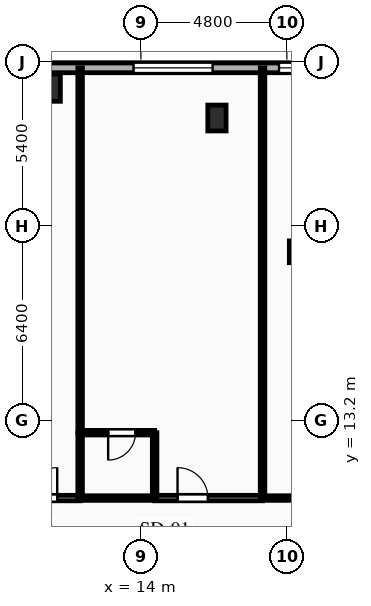
"""IFC4 building model, lengths in metres.
Left out: names, types, materials, properties, quantities, classifications, styles, units other than length and angle.
Written with IfcOpenShell. Run it as: python <this file> out.ifc"""

import sys

from ifc_helpers import new_model, si_unit, direction, frame, frame_2d, origin, origin_2d, place, context, subcontext, project, spatial, rectangle, i_section, extrude, element, fill, save


model = new_model("IFC4")
c1 = context("Model", 3, precision=1e-05, world=origin(), true_north=direction((0.0, 1.0)))
c2 = subcontext(c1, "Body", "Model", "MODEL_VIEW")
j1 = project(units=[si_unit("LENGTHUNIT", "METRE"), si_unit("PLANEANGLEUNIT", "RADIAN")], contexts=[c1])
p1 = place(None, origin())
s1 = spatial("IfcSite", under=j1, at=p1, CompositionType="ELEMENT")
p2 = place(p1, origin())
s2 = spatial("IfcBuilding", under=s1, at=p2, CompositionType="ELEMENT")
p3 = place(p2, frame((0.0, 0.0, 22.5)))
s3 = spatial("IfcBuildingStorey", under=s2, at=p3, CompositionType="ELEMENT", Elevation=22.5)
p4 = place(p3, frame((11.0, 24.15, 0.0), z_axis=(0.0, 0.0, 1.0), x_axis=(1.0, 0.0, 0.0)))
e1 = element("IfcColumn", 1, at=p4, inside=s3, PredefinedType="COLUMN", context=c2, shape_type="SweptSolid", body=[
    extrude(rectangle(XDim=0.7, YDim=0.9, at=origin_2d()), origin(), (0.0, 0.0, 1.0), 4.5),
])
p5 = place(p3, frame((16.5, 23.15, 0.0), z_axis=(0.0, 0.0, 1.0), x_axis=(1.0, 0.0, 0.0)))
e2 = element("IfcColumn", 2, at=p5, inside=s3, PredefinedType="PILASTER", context=c2, shape_type="SweptSolid", body=[
    extrude(rectangle(XDim=0.6, YDim=0.85, at=origin_2d()), origin(), (0.0, 0.0, 1.0), 4.5),
])
p6 = place(p3, frame((19.033, 18.75, 0.0), z_axis=(0.0, 0.0, 1.0), x_axis=(1.0, 0.0, 0.0)))
e3 = element("IfcColumn", 3, at=p6, inside=s3, PredefinedType="COLUMN", context=c2, shape_type="SweptSolid", body=[
    extrude(i_section(OverallWidth=0.304, OverallDepth=0.716, WebThickness=0.021, FlangeThickness=0.04, FilletRadius=0.027, at=origin_2d()), origin(), (0.0, 0.0, 1.0), 4.5),
])
p7 = place(p3, frame((-36.8, 24.8, 0.0), z_axis=(0.0, 0.0, 1.0), x_axis=(1.0, 0.0, 0.0)))
e4 = element("IfcWall", 4, at=p7, inside=s3, PredefinedType="SOLIDWALL", context=c2, shape_type="SweptSolid", body=[
    extrude(rectangle(XDim=73.6, YDim=0.32, at=frame_2d((36.8, 0.0))), origin(), (0.0, 0.0, 1.0), 4.16),
])
p8 = place(p7, frame((1.079, 0.0, 0.85)))
e5 = element("IfcOpeningElement", 5, at=p8, cuts=e4, PredefinedType="OPENING", context=c2, shape_type="SweptSolid", body=[
    extrude(rectangle(XDim=2.3, YDim=2.4, at=frame_2d((1.15, 1.2))), frame((0.0, 0.17, 0.0), z_axis=(0.0, -1.0, 0.0), x_axis=(1.0, 0.0, 0.0)), (0.0, 0.0, 1.0), 0.34),
])
p9 = place(p7, frame((8.431, 0.0, 0.85)))
e6 = element("IfcOpeningElement", 6, at=p9, cuts=e4, PredefinedType="OPENING", context=c2, shape_type="SweptSolid", body=[
    extrude(rectangle(XDim=2.6, YDim=2.4, at=frame_2d((1.3, 1.2))), frame((0.0, 0.17, 0.0), z_axis=(0.0, -1.0, 0.0), x_axis=(1.0, 0.0, 0.0)), (0.0, 0.0, 1.0), 0.34),
])
p10 = place(p7, frame((13.316, 0.0, 0.85)))
e7 = element("IfcOpeningElement", 7, at=p10, cuts=e4, PredefinedType="OPENING", context=c2, shape_type="SweptSolid", body=[
    extrude(rectangle(XDim=1.1, YDim=1.85, at=frame_2d((0.55, 0.925))), frame((0.0, 0.17, 0.0), z_axis=(0.0, -1.0, 0.0), x_axis=(1.0, 0.0, 0.0)), (0.0, 0.0, 1.0), 0.34),
])
p11 = place(p7, frame((16.339, 0.0, 0.85)))
e8 = element("IfcOpeningElement", 8, at=p11, cuts=e4, PredefinedType="OPENING", context=c2, shape_type="SweptSolid", body=[
    extrude(rectangle(XDim=2.0, YDim=2.4, at=frame_2d((1.0, 1.2))), frame((0.0, 0.17, 0.0), z_axis=(0.0, -1.0, 0.0), x_axis=(1.0, 0.0, 0.0)), (0.0, 0.0, 1.0), 0.34),
])
p12 = place(p7, frame((21.875, 0.0, 0.85)))
e9 = element("IfcOpeningElement", 9, at=p12, cuts=e4, PredefinedType="OPENING", context=c2, shape_type="SweptSolid", body=[
    extrude(rectangle(XDim=2.3, YDim=2.4, at=frame_2d((1.15, 1.2))), frame((0.0, 0.17, 0.0), z_axis=(0.0, -1.0, 0.0), x_axis=(1.0, 0.0, 0.0)), (0.0, 0.0, 1.0), 0.34),
])
p13 = place(p7, frame((26.53, 0.0, 0.85)))
e10 = element("IfcOpeningElement", 10, at=p13, cuts=e4, PredefinedType="OPENING", context=c2, shape_type="SweptSolid", body=[
    extrude(rectangle(XDim=2.6, YDim=2.4, at=frame_2d((1.3, 1.2))), frame((0.0, 0.17, 0.0), z_axis=(0.0, -1.0, 0.0), x_axis=(1.0, 0.0, 0.0)), (0.0, 0.0, 1.0), 0.34),
])
p14 = place(p7, frame((32.537, 0.0, 0.85)))
e11 = element("IfcOpeningElement", 11, at=p14, cuts=e4, PredefinedType="OPENING", context=c2, shape_type="SweptSolid", body=[
    extrude(rectangle(XDim=2.6, YDim=2.4, at=frame_2d((1.3, 1.2))), frame((0.0, 0.17, 0.0), z_axis=(0.0, -1.0, 0.0), x_axis=(1.0, 0.0, 0.0)), (0.0, 0.0, 1.0), 0.34),
])
p15 = place(p7, frame((38.543, 0.0, 0.85)))
e12 = element("IfcOpeningElement", 12, at=p15, cuts=e4, PredefinedType="OPENING", context=c2, shape_type="SweptSolid", body=[
    extrude(rectangle(XDim=2.6, YDim=2.4, at=frame_2d((1.3, 1.2))), frame((0.0, 0.17, 0.0), z_axis=(0.0, -1.0, 0.0), x_axis=(1.0, 0.0, 0.0)), (0.0, 0.0, 1.0), 0.34),
])
p16 = place(p7, frame((44.55, 0.0, 0.85)))
e13 = element("IfcOpeningElement", 13, at=p16, cuts=e4, PredefinedType="OPENING", context=c2, shape_type="SweptSolid", body=[
    extrude(rectangle(XDim=2.6, YDim=2.4, at=frame_2d((1.3, 1.2))), frame((0.0, 0.17, 0.0), z_axis=(0.0, -1.0, 0.0), x_axis=(1.0, 0.0, 0.0)), (0.0, 0.0, 1.0), 0.34),
])
p17 = place(p7, frame((50.556, 0.0, 0.85)))
e14 = element("IfcOpeningElement", 14, at=p17, cuts=e4, PredefinedType="OPENING", context=c2, shape_type="SweptSolid", body=[
    extrude(rectangle(XDim=2.6, YDim=2.4, at=frame_2d((1.3, 1.2))), frame((0.0, 0.17, 0.0), z_axis=(0.0, -1.0, 0.0), x_axis=(1.0, 0.0, 0.0)), (0.0, 0.0, 1.0), 0.34),
])
p18 = place(p7, frame((55.341, 0.0, 0.85)))
e15 = element("IfcOpeningElement", 15, at=p18, cuts=e4, PredefinedType="OPENING", context=c2, shape_type="SweptSolid", body=[
    extrude(rectangle(XDim=2.0, YDim=2.4, at=frame_2d((1.0, 1.2))), frame((0.0, 0.17, 0.0), z_axis=(0.0, -1.0, 0.0), x_axis=(1.0, 0.0, 0.0)), (0.0, 0.0, 1.0), 0.34),
])
p19 = place(p7, frame((59.16, 0.0, 0.85)))
e16 = element("IfcOpeningElement", 16, at=p19, cuts=e4, PredefinedType="OPENING", context=c2, shape_type="SweptSolid", body=[
    extrude(rectangle(XDim=1.1, YDim=1.85, at=frame_2d((0.55, 0.925))), frame((0.0, 0.17, 0.0), z_axis=(0.0, -1.0, 0.0), x_axis=(1.0, 0.0, 0.0)), (0.0, 0.0, 1.0), 0.34),
])
p20 = place(p7, frame((62.649, 0.0, 0.85)))
e17 = element("IfcOpeningElement", 17, at=p20, cuts=e4, PredefinedType="OPENING", context=c2, shape_type="SweptSolid", body=[
    extrude(rectangle(XDim=2.6, YDim=2.4, at=frame_2d((1.3, 1.2))), frame((0.0, 0.17, 0.0), z_axis=(0.0, -1.0, 0.0), x_axis=(1.0, 0.0, 0.0)), (0.0, 0.0, 1.0), 0.34),
])
p21 = place(p7, frame((70.301, 0.0, 0.85)))
e18 = element("IfcOpeningElement", 18, at=p21, cuts=e4, PredefinedType="OPENING", context=c2, shape_type="SweptSolid", body=[
    extrude(rectangle(XDim=2.3, YDim=2.4, at=frame_2d((1.15, 1.2))), frame((0.0, 0.17, 0.0), z_axis=(0.0, -1.0, 0.0), x_axis=(1.0, 0.0, 0.0)), (0.0, 0.0, 1.0), 0.34),
])
p22 = place(p3, frame((8.45, 10.65, 0.0), z_axis=(0.0, 0.0, 1.0), x_axis=(1.0, 0.0, 0.0)))
e19 = element("IfcWall", 19, at=p22, inside=s3, PredefinedType="PARTITIONING", context=c2, shape_type="SweptSolid", body=[
    extrude(rectangle(XDim=3.55, YDim=0.18, at=frame_2d((1.775, 0.0))), origin(), (0.0, 0.0, 1.0), 4.16),
])
p23 = place(p22, frame((1.796, 0.0, 0.0)))
e20 = element("IfcOpeningElement", 20, at=p23, cuts=e19, PredefinedType="OPENING", context=c2, shape_type="SweptSolid", body=[
    extrude(rectangle(XDim=1.0, YDim=2.15, at=frame_2d((0.5, 1.075))), frame((0.0, 0.1, 0.0), z_axis=(0.0, -1.0, 0.0), x_axis=(1.0, 0.0, 0.0)), (0.0, 0.0, 1.0), 0.2),
])
p24 = place(p3, frame((14.45, 10.65, 0.0), z_axis=(0.0, 0.0, 1.0), x_axis=(1.0, 0.0, 0.0)))
e21 = element("IfcWall", 21, at=p24, inside=s3, PredefinedType="PARTITIONING", context=c2, shape_type="SweptSolid", body=[
    extrude(rectangle(XDim=3.55, YDim=0.18, at=frame_2d((1.775, 0.0))), origin(), (0.0, 0.0, 1.0), 4.16),
])
p25 = place(p24, frame((0.754, 0.0, 0.0)))
e22 = element("IfcOpeningElement", 22, at=p25, cuts=e21, PredefinedType="OPENING", context=c2, shape_type="SweptSolid", body=[
    extrude(rectangle(XDim=1.0, YDim=2.15, at=frame_2d((0.5, 1.075))), frame((0.0, 0.1, 0.0), z_axis=(0.0, -1.0, 0.0), x_axis=(1.0, 0.0, 0.0)), (0.0, 0.0, 1.0), 0.2),
])
p26 = place(p3, frame((12.0, 10.65, 0.0), z_axis=(0.0, 0.0, 1.0), x_axis=(1.0, 0.0, 0.0)))
e23 = element("IfcWall", 23, at=p26, inside=s3, PredefinedType="PLUMBINGWALL", context=c2, shape_type="SweptSolid", body=[
    extrude(rectangle(XDim=2.45, YDim=0.15, at=frame_2d((1.225, 0.0))), origin(), (0.0, 0.0, 1.0), 4.16),
])
p27 = place(p3, frame((18.0, 10.65, 0.0), z_axis=(0.0, 0.0, 1.0), x_axis=(1.0, 0.0, 0.0)))
e24 = element("IfcWall", 24, at=p27, inside=s3, PredefinedType="PARTITIONING", context=c2, shape_type="SweptSolid", body=[
    extrude(rectangle(XDim=3.0, YDim=0.15, at=frame_2d((1.5, 0.0))), origin(), (0.0, 0.0, 1.0), 4.16),
])
p28 = place(p27, frame((1.271, 0.0, 0.0)))
e25 = element("IfcOpeningElement", 25, at=p28, cuts=e24, PredefinedType="OPENING", context=c2, shape_type="SweptSolid", body=[
    extrude(rectangle(XDim=1.05, YDim=2.15, at=frame_2d((0.525, 1.075))), frame((0.0, 0.085, 0.0), z_axis=(0.0, -1.0, 0.0), x_axis=(1.0, 0.0, 0.0)), (0.0, 0.0, 1.0), 0.17),
])
p29 = place(p3, frame((12.0, 24.8, 0.0), z_axis=(0.0, 0.0, 1.0), x_axis=(0.0, -1.0, 0.0)))
e26 = element("IfcWall", 26, at=p29, inside=s3, PredefinedType="PARTITIONING", context=c2, shape_type="SweptSolid", body=[
    extrude(rectangle(XDim=12.0, YDim=0.15, at=frame_2d((6.0, 0.0))), origin(), (0.0, 0.0, 1.0), 4.16),
])
p30 = place(p3, frame((12.0, 12.8, 0.0), z_axis=(0.0, 0.0, 1.0), x_axis=(0.0, -1.0, 0.0)))
e27 = element("IfcWall", 27, at=p30, inside=s3, PredefinedType="PLUMBINGWALL", context=c2, shape_type="SweptSolid", body=[
    extrude(rectangle(XDim=2.15, YDim=0.15, at=frame_2d((1.075, 0.0))), origin(), (0.0, 0.0, 1.0), 4.16),
])
p31 = place(p3, frame((14.45, 12.8, 0.0), z_axis=(0.0, 0.0, 1.0), x_axis=(-1.0, 0.0, 0.0)))
e28 = element("IfcWall", 28, at=p31, inside=s3, PredefinedType="PLUMBINGWALL", context=c2, shape_type="SweptSolid", body=[
    extrude(rectangle(XDim=2.45, YDim=0.15, at=frame_2d((1.225, 0.0))), origin(), (0.0, 0.0, 1.0), 4.16),
])
p32 = place(p31, frame((0.629, 0.0, 0.0)))
e29 = element("IfcOpeningElement", 29, at=p32, cuts=e28, PredefinedType="OPENING", context=c2, shape_type="SweptSolid", body=[
    extrude(rectangle(XDim=0.9, YDim=2.1, at=frame_2d((0.45, 1.05))), frame((0.0, 0.085, 0.0), z_axis=(0.0, -1.0, 0.0), x_axis=(1.0, 0.0, 0.0)), (0.0, 0.0, 1.0), 0.17),
])
p33 = place(p3, frame((14.45, 10.65, 0.0), z_axis=(0.0, 0.0, 1.0), x_axis=(0.0, 1.0, 0.0)))
e30 = element("IfcWall", 30, at=p33, inside=s3, PredefinedType="PLUMBINGWALL", context=c2, shape_type="SweptSolid", body=[
    extrude(rectangle(XDim=2.15, YDim=0.15, at=frame_2d((1.075, 0.0))), origin(), (0.0, 0.0, 1.0), 4.16),
])
p34 = place(p3, frame((18.0, 24.8, 0.0), z_axis=(0.0, 0.0, 1.0), x_axis=(0.0, -1.0, 0.0)))
e31 = element("IfcWall", 31, at=p34, inside=s3, PredefinedType="PARTITIONING", context=c2, shape_type="SweptSolid", body=[
    extrude(rectangle(XDim=14.15, YDim=0.15, at=frame_2d((7.075, 0.0))), origin(), (0.0, 0.0, 1.0), 4.16),
])
p35 = place(p17, origin())
e32 = element("IfcWindow", 32, at=p35, inside=s3, PartitioningType="SINGLE_PANEL", PredefinedType="WINDOW", context=c2, shape_type="SweptSolid", body=[
    extrude(rectangle(XDim=2.6, YDim=2.4, at=frame_2d((1.3, 1.2))), frame((0.0, 0.03, 0.0), z_axis=(0.0, -1.0, 0.0), x_axis=(1.0, 0.0, 0.0)), (0.0, 0.0, 1.0), 0.06),
])
fill(e14, e32)
p36 = place(p18, origin())
e33 = element("IfcWindow", 33, at=p36, inside=s3, PartitioningType="SINGLE_PANEL", PredefinedType="WINDOW", context=c2, shape_type="SweptSolid", body=[
    extrude(rectangle(XDim=2.0, YDim=2.4, at=frame_2d((1.0, 1.2))), frame((0.0, 0.03, 0.0), z_axis=(0.0, -1.0, 0.0), x_axis=(1.0, 0.0, 0.0)), (0.0, 0.0, 1.0), 0.06),
])
fill(e15, e33)
p37 = place(p23, origin())
e34 = element("IfcDoor", 34, at=p37, inside=s3, OperationType="SINGLE_SWING_RIGHT", PredefinedType="DOOR", context=c2, shape_type="SweptSolid", body=[
    extrude(rectangle(XDim=1.0, YDim=2.15, at=frame_2d((0.5, 1.075))), frame((0.0, 0.025, 0.0), z_axis=(0.0, -1.0, 0.0), x_axis=(1.0, 0.0, 0.0)), (0.0, 0.0, 1.0), 0.05),
])
fill(e20, e34)
p38 = place(p25, origin())
e35 = element("IfcDoor", 35, at=p38, inside=s3, OperationType="SINGLE_SWING_LEFT", PredefinedType="DOOR", context=c2, shape_type="SweptSolid", body=[
    extrude(rectangle(XDim=1.0, YDim=2.15, at=frame_2d((0.5, 1.075))), frame((0.0, 0.025, 0.0), z_axis=(0.0, -1.0, 0.0), x_axis=(1.0, 0.0, 0.0)), (0.0, 0.0, 1.0), 0.05),
])
fill(e22, e35)
p39 = place(p32, origin())
e36 = element("IfcDoor", 36, at=p39, inside=s3, OperationType="SINGLE_SWING_RIGHT", PredefinedType="DOOR", context=c2, shape_type="SweptSolid", body=[
    extrude(rectangle(XDim=0.9, YDim=2.1, at=frame_2d((0.45, 1.05))), frame((0.0, 0.025, 0.0), z_axis=(0.0, -1.0, 0.0), x_axis=(1.0, 0.0, 0.0)), (0.0, 0.0, 1.0), 0.05),
])
fill(e29, e36)
save(model, sys.argv[1])
